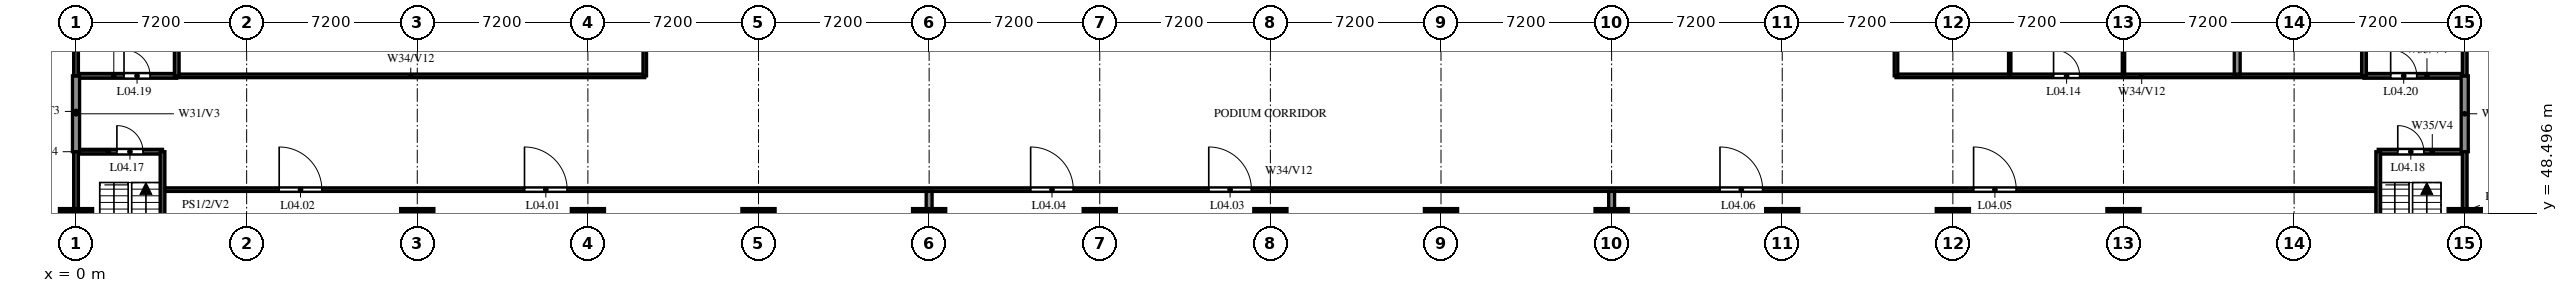
"""IFC4 building model, lengths in metres.
Left out: names, types, materials, properties, quantities, classifications, styles, units other than length and angle.
Written with IfcOpenShell. Run it as: python <this file> out.ifc"""

import sys

from ifc_helpers import new_model, si_unit, direction, frame, frame_2d, origin, origin_2d, place, context, subcontext, project, spatial, rectangle, circle, extrude, source, transform, mapped, element, fill, save


model = new_model("IFC4")
c1 = context("Model", 3, precision=1e-05, world=origin(), true_north=direction((0.0, 1.0)))
c2 = subcontext(c1, "Body", "Model", "MODEL_VIEW")
j1 = project(units=[si_unit("LENGTHUNIT", "METRE"), si_unit("PLANEANGLEUNIT", "RADIAN")], contexts=[c1])
p1 = place(None, origin())
s1 = spatial("IfcSite", under=j1, at=p1, CompositionType="ELEMENT")
p2 = place(p1, origin())
s2 = spatial("IfcBuilding", under=s1, at=p2, CompositionType="ELEMENT")
p3 = place(p2, frame((0.0, 0.0, 21.6)))
s3 = spatial("IfcBuildingStorey", under=s2, at=p3, CompositionType="ELEMENT", Elevation=21.6)
m1 = source(origin(), c2, "Body", "SweptSolid", [
    extrude(circle(Radius=0.7, at=origin_2d()), origin(), (0.0, 0.0, 1.0), 4.95),
])
for number, where, z_axis, x_axis in (
    (1, (0.0, 48.0, 0.0), (0.0, 0.0, 1.0), (1.0, 0.0, 0.0)),
    (2, (14.4, 48.0, 0.0), (0.0, 0.0, 1.0), (1.0, 0.0, 0.0)),
    (3, (21.6, 48.0, 0.0), (0.0, 0.0, 1.0), (1.0, 0.0, 0.0)),
    (4, (28.8, 48.0, 0.0), (0.0, 0.0, 1.0), (1.0, 0.0, 0.0)),
    (5, (36.0, 48.0, 0.0), (0.0, 0.0, 1.0), (1.0, 0.0, 0.0)),
    (6, (43.2, 48.0, 0.0), (0.0, 0.0, 1.0), (1.0, 0.0, 0.0)),
    (7, (50.4, 48.0, 0.0), (0.0, 0.0, 1.0), (1.0, 0.0, 0.0)),
    (8, (57.6, 48.0, 0.0), (0.0, 0.0, 1.0), (1.0, 0.0, 0.0)),
    (9, (64.8, 48.0, 0.0), (0.0, 0.0, 1.0), (1.0, 0.0, 0.0)),
    (10, (72.0, 48.0, 0.0), (0.0, 0.0, 1.0), (1.0, 0.0, 0.0)),
    (11, (79.2, 48.0, 0.0), (0.0, 0.0, 1.0), (1.0, 0.0, 0.0)),
    (12, (86.4, 48.0, 0.0), (0.0, 0.0, 1.0), (1.0, 0.0, 0.0)),
    (13, (100.8, 48.0, 0.0), (0.0, 0.0, 1.0), (1.0, 0.0, 0.0)),
):
    element("IfcColumn", number, at=place(p3, frame(where, z_axis=z_axis, x_axis=x_axis)), inside=s3, PredefinedType="COLUMN", context=c2, shape_type="MappedRepresentation", body=[
        mapped(m1, transform((0.0, 0.0, 0.0))),
    ])
p4 = place(p3, frame((3.75, 49.5, 0.0), z_axis=(0.0, 0.0, 1.0), x_axis=(1.0, 0.0, 0.0)))
e14 = element("IfcWall", 14, at=p4, inside=s3, PredefinedType="PARTITIONING", context=c2, shape_type="SweptSolid", body=[
    extrude(rectangle(XDim=93.3, YDim=0.15, at=frame_2d((46.65, 0.0))), origin(), (0.0, 0.0, 1.0), 3.45),
])
p5 = place(p4, frame((15.175, 0.0, 0.0)))
e15 = element("IfcOpeningElement", 15, at=p5, cuts=e14, PredefinedType="OPENING", context=c2, shape_type="SweptSolid", body=[
    extrude(rectangle(XDim=1.8, YDim=2.1, at=frame_2d((0.9, 1.05))), frame((0.0, 0.085, 0.0), z_axis=(0.0, -1.0, 0.0), x_axis=(1.0, 0.0, 0.0)), (0.0, 0.0, 1.0), 0.17),
])
p6 = place(p4, frame((4.823, 0.0, 0.0)))
e16 = element("IfcOpeningElement", 16, at=p6, cuts=e14, PredefinedType="OPENING", context=c2, shape_type="SweptSolid", body=[
    extrude(rectangle(XDim=1.8, YDim=2.1, at=frame_2d((0.9, 1.05))), frame((0.0, 0.085, 0.0), z_axis=(0.0, -1.0, 0.0), x_axis=(1.0, 0.0, 0.0)), (0.0, 0.0, 1.0), 0.17),
])
p7 = place(p4, frame((44.05, 0.0, 0.0)))
e17 = element("IfcOpeningElement", 17, at=p7, cuts=e14, PredefinedType="OPENING", context=c2, shape_type="SweptSolid", body=[
    extrude(rectangle(XDim=1.8, YDim=2.1, at=frame_2d((0.9, 1.05))), frame((0.0, 0.085, 0.0), z_axis=(0.0, -1.0, 0.0), x_axis=(1.0, 0.0, 0.0)), (0.0, 0.0, 1.0), 0.17),
])
p8 = place(p4, frame((36.534, 0.0, 0.0)))
e18 = element("IfcOpeningElement", 18, at=p8, cuts=e14, PredefinedType="OPENING", context=c2, shape_type="SweptSolid", body=[
    extrude(rectangle(XDim=1.8, YDim=2.1, at=frame_2d((0.9, 1.05))), frame((0.0, 0.085, 0.0), z_axis=(0.0, -1.0, 0.0), x_axis=(1.0, 0.0, 0.0)), (0.0, 0.0, 1.0), 0.17),
])
p9 = place(p4, frame((76.325, 0.0, 0.0)))
e19 = element("IfcOpeningElement", 19, at=p9, cuts=e14, PredefinedType="OPENING", context=c2, shape_type="SweptSolid", body=[
    extrude(rectangle(XDim=1.8, YDim=2.1, at=frame_2d((0.9, 1.05))), frame((0.0, 0.085, 0.0), z_axis=(0.0, -1.0, 0.0), x_axis=(1.0, 0.0, 0.0)), (0.0, 0.0, 1.0), 0.17),
])
p10 = place(p4, frame((65.623, 0.0, 0.0)))
e20 = element("IfcOpeningElement", 20, at=p10, cuts=e14, PredefinedType="OPENING", context=c2, shape_type="SweptSolid", body=[
    extrude(rectangle(XDim=1.8, YDim=2.1, at=frame_2d((0.9, 1.05))), frame((0.0, 0.085, 0.0), z_axis=(0.0, -1.0, 0.0), x_axis=(1.0, 0.0, 0.0)), (0.0, 0.0, 1.0), 0.17),
])
p11 = place(p3, frame((0.0, 51.1, 0.0), z_axis=(0.0, 0.0, 1.0), x_axis=(1.0, 0.0, 0.0)))
e21 = element("IfcWall", 21, at=p11, inside=s3, PredefinedType="SOLIDWALL", context=c2, shape_type="SweptSolid", body=[
    extrude(rectangle(XDim=3.65, YDim=0.2, at=frame_2d((1.825, 0.0))), origin(), (0.0, 0.0, 1.0), 4.95),
])
p12 = place(p11, frame((1.725, 0.0, 0.0)))
e22 = element("IfcOpeningElement", 22, at=p12, cuts=e21, PredefinedType="OPENING", context=c2, shape_type="SweptSolid", body=[
    extrude(rectangle(XDim=1.1, YDim=2.1, at=frame_2d((0.55, 1.05))), frame((0.0, 0.11, 0.0), z_axis=(0.0, -1.0, 0.0), x_axis=(1.0, 0.0, 0.0)), (0.0, 0.0, 1.0), 0.22),
])
p13 = place(p3, frame((97.15, 51.1, 0.0), z_axis=(0.0, 0.0, 1.0), x_axis=(1.0, 0.0, 0.0)))
e23 = element("IfcWall", 23, at=p13, inside=s3, PredefinedType="SOLIDWALL", context=c2, shape_type="SweptSolid", body=[
    extrude(rectangle(XDim=3.65, YDim=0.2, at=frame_2d((1.825, 0.0))), origin(), (0.0, 0.0, 1.0), 4.95),
])
p14 = place(p13, frame((0.825, 0.0, 0.0)))
e24 = element("IfcOpeningElement", 24, at=p14, cuts=e23, PredefinedType="OPENING", context=c2, shape_type="SweptSolid", body=[
    extrude(rectangle(XDim=1.1, YDim=2.1, at=frame_2d((0.55, 1.05))), frame((0.0, 0.11, 0.0), z_axis=(0.0, -1.0, 0.0), x_axis=(1.0, 0.0, 0.0)), (0.0, 0.0, 1.0), 0.22),
])
p15 = place(p3, frame((4.25, 54.3, 0.0), z_axis=(0.0, 0.0, 1.0), x_axis=(1.0, 0.0, 0.0)))
e25 = element("IfcWall", 25, at=p15, inside=s3, PredefinedType="PARTITIONING", context=c2, shape_type="SweptSolid", body=[
    extrude(rectangle(XDim=19.75, YDim=0.15, at=frame_2d((9.875, 0.0))), origin(), (0.0, 0.0, 1.0), 3.45),
])
p16 = place(p3, frame((76.8, 54.3, 0.0), z_axis=(0.0, 0.0, 1.0), x_axis=(1.0, 0.0, 0.0)))
e26 = element("IfcWall", 26, at=p16, inside=s3, PredefinedType="PARTITIONING", context=c2, shape_type="SweptSolid", body=[
    extrude(rectangle(XDim=19.75, YDim=0.15, at=frame_2d((9.875, 0.0))), origin(), (0.0, 0.0, 1.0), 3.45),
])
p17 = place(p16, frame((6.65, 0.0, 0.0)))
e27 = element("IfcOpeningElement", 27, at=p17, cuts=e26, PredefinedType="OPENING", context=c2, shape_type="SweptSolid", body=[
    extrude(rectangle(XDim=1.1, YDim=2.1, at=frame_2d((0.55, 1.05))), frame((0.0, 0.085, 0.0), z_axis=(0.0, -1.0, 0.0), x_axis=(1.0, 0.0, 0.0)), (0.0, 0.0, 1.0), 0.17),
])
p18 = place(p3, frame((0.0, 54.3, 0.0), z_axis=(0.0, 0.0, 1.0), x_axis=(1.0, 0.0, 0.0)))
e28 = element("IfcWall", 28, at=p18, inside=s3, PredefinedType="SOLIDWALL", context=c2, shape_type="SweptSolid", body=[
    extrude(rectangle(XDim=4.25, YDim=0.2, at=frame_2d((2.125, 0.0))), origin(), (0.0, 0.0, 1.0), 4.95),
])
p19 = place(p18, frame((2.025, 0.0, 0.0)))
e29 = element("IfcOpeningElement", 29, at=p19, cuts=e28, PredefinedType="OPENING", context=c2, shape_type="SweptSolid", body=[
    extrude(rectangle(XDim=1.1, YDim=2.1, at=frame_2d((0.55, 1.05))), frame((0.0, 0.11, 0.0), z_axis=(0.0, -1.0, 0.0), x_axis=(1.0, 0.0, 0.0)), (0.0, 0.0, 1.0), 0.22),
])
p20 = place(p3, frame((96.55, 54.3, 0.0), z_axis=(0.0, 0.0, 1.0), x_axis=(1.0, 0.0, 0.0)))
e30 = element("IfcWall", 30, at=p20, inside=s3, PredefinedType="SOLIDWALL", context=c2, shape_type="SweptSolid", body=[
    extrude(rectangle(XDim=4.25, YDim=0.2, at=frame_2d((2.125, 0.0))), origin(), (0.0, 0.0, 1.0), 4.95),
])
p21 = place(p20, frame((1.125, 0.0, 0.0)))
e31 = element("IfcOpeningElement", 31, at=p21, cuts=e30, PredefinedType="OPENING", context=c2, shape_type="SweptSolid", body=[
    extrude(rectangle(XDim=1.1, YDim=2.1, at=frame_2d((0.55, 1.05))), frame((0.0, 0.11, 0.0), z_axis=(0.0, -1.0, 0.0), x_axis=(1.0, 0.0, 0.0)), (0.0, 0.0, 1.0), 0.22),
])
p22 = place(p3, frame((0.0, 51.1, 0.0), z_axis=(0.0, 0.0, 1.0), x_axis=(0.0, 1.0, 0.0)))
e32 = element("IfcWall", 32, at=p22, inside=s3, PredefinedType="SOLIDWALL", context=c2, shape_type="SweptSolid", body=[
    extrude(rectangle(XDim=3.2, YDim=0.3, at=frame_2d((1.6, 0.0))), origin(), (0.0, 0.0, 1.0), 4.95),
])
p23 = place(p3, frame((0.0, 42.9, 0.0), z_axis=(0.0, 0.0, 1.0), x_axis=(0.0, 1.0, 0.0)))
e33 = element("IfcWall", 33, at=p23, inside=s3, PredefinedType="SOLIDWALL", context=c2, shape_type="SweptSolid", body=[
    extrude(rectangle(XDim=8.2, YDim=0.2, at=frame_2d((4.1, 0.0))), origin(), (0.0, 0.0, 1.0), 4.95),
])
p24 = place(p3, frame((0.0, 54.3, 0.0), z_axis=(0.0, 0.0, 1.0), x_axis=(0.0, 1.0, 0.0)))
e34 = element("IfcWall", 34, at=p24, inside=s3, PredefinedType="SOLIDWALL", context=c2, shape_type="SweptSolid", body=[
    extrude(rectangle(XDim=8.8, YDim=0.2, at=frame_2d((4.4, 0.0))), origin(), (0.0, 0.0, 1.0), 4.95),
])
p25 = place(p3, frame((3.65, 42.9, 0.0), z_axis=(0.0, 0.0, 1.0), x_axis=(0.0, 1.0, 0.0)))
e35 = element("IfcWall", 35, at=p25, inside=s3, PredefinedType="SOLIDWALL", context=c2, shape_type="SweptSolid", body=[
    extrude(rectangle(XDim=8.2, YDim=0.2, at=frame_2d((4.1, 0.0))), origin(), (0.0, 0.0, 1.0), 4.95),
])
p26 = place(p3, frame((4.25, 54.3, 0.0), z_axis=(0.0, 0.0, 1.0), x_axis=(0.0, 1.0, 0.0)))
e36 = element("IfcWall", 36, at=p26, inside=s3, PredefinedType="SOLIDWALL", context=c2, shape_type="SweptSolid", body=[
    extrude(rectangle(XDim=8.8, YDim=0.2, at=frame_2d((4.4, 0.0))), origin(), (0.0, 0.0, 1.0), 4.95),
])
p27 = place(p3, frame((24.0, 54.3, 0.0), z_axis=(0.0, 0.0, 1.0), x_axis=(0.0, 1.0, 0.0)))
e37 = element("IfcWall", 37, at=p27, inside=s3, PredefinedType="PARTITIONING", context=c2, shape_type="SweptSolid", body=[
    extrude(rectangle(XDim=31.95, YDim=0.15, at=frame_2d((15.975, 0.0))), origin(), (0.0, 0.0, 1.0), 3.75),
])
p28 = place(p27, frame((7.05, 0.0, 0.0)))
e38 = element("IfcOpeningElement", 38, at=p28, cuts=e37, PredefinedType="OPENING", context=c2, shape_type="SweptSolid", body=[
    extrude(rectangle(XDim=1.8, YDim=2.1, at=frame_2d((0.9, 1.05))), frame((0.0, 0.085, 0.0), z_axis=(0.0, -1.0, 0.0), x_axis=(1.0, 0.0, 0.0)), (0.0, 0.0, 1.0), 0.17),
])
p29 = place(p27, frame((23.1, 0.0, 0.0)))
e39 = element("IfcOpeningElement", 39, at=p29, cuts=e37, PredefinedType="OPENING", context=c2, shape_type="SweptSolid", body=[
    extrude(rectangle(XDim=1.8, YDim=2.1, at=frame_2d((0.9, 1.05))), frame((0.0, 0.085, 0.0), z_axis=(0.0, -1.0, 0.0), x_axis=(1.0, 0.0, 0.0)), (0.0, 0.0, 1.0), 0.17),
])
for number, where, z_axis, x_axis in (
    (40, (36.0, 19.35, 0.0), (0.0, 0.0, 1.0), (0.0, 1.0, 0.0)),
    (41, (64.8, 19.35, 0.0), (0.0, 0.0, 1.0), (0.0, 1.0, 0.0)),
):
    element("IfcWall", number, at=place(p3, frame(where, z_axis=z_axis, x_axis=x_axis)), inside=s3, PredefinedType="SOLIDWALL", context=c2, shape_type="SweptSolid", body=[
        extrude(rectangle(XDim=30.075, YDim=0.25, at=frame_2d((15.038, 0.0))), origin(), (0.0, 0.0, 1.0), 3.45),
    ])
p30 = place(p3, frame((76.8, 54.3, 0.0), z_axis=(0.0, 0.0, 1.0), x_axis=(0.0, 1.0, 0.0)))
e42 = element("IfcWall", 42, at=p30, inside=s3, PredefinedType="PARTITIONING", context=c2, shape_type="SweptSolid", body=[
    extrude(rectangle(XDim=31.95, YDim=0.15, at=frame_2d((15.975, 0.0))), origin(), (0.0, 0.0, 1.0), 3.75),
])
p31 = place(p30, frame((10.65, 0.0, 0.0)))
e43 = element("IfcOpeningElement", 43, at=p31, cuts=e42, PredefinedType="OPENING", context=c2, shape_type="SweptSolid", body=[
    extrude(rectangle(XDim=1.8, YDim=2.1, at=frame_2d((0.9, 1.05))), frame((0.0, 0.085, 0.0), z_axis=(0.0, -1.0, 0.0), x_axis=(1.0, 0.0, 0.0)), (0.0, 0.0, 1.0), 0.17),
])
p32 = place(p30, frame((23.45, 0.0, 0.0)))
e44 = element("IfcOpeningElement", 44, at=p32, cuts=e42, PredefinedType="OPENING", context=c2, shape_type="SweptSolid", body=[
    extrude(rectangle(XDim=1.1, YDim=2.1, at=frame_2d((0.55, 1.05))), frame((0.0, 0.085, 0.0), z_axis=(0.0, -1.0, 0.0), x_axis=(1.0, 0.0, 0.0)), (0.0, 0.0, 1.0), 0.17),
])
p33 = place(p3, frame((81.6, 54.375, 0.0), z_axis=(0.0, 0.0, 1.0), x_axis=(0.0, 1.0, 0.0)))
e45 = element("IfcWall", 45, at=p33, inside=s3, PredefinedType="PARTITIONING", context=c2, shape_type="SweptSolid", body=[
    extrude(rectangle(XDim=7.0, YDim=0.1, at=frame_2d((3.5, 0.0))), origin(), (0.0, 0.0, 1.0), 4.95),
])
p34 = place(p33, frame((1.525, 0.0, 0.0)))
e46 = element("IfcOpeningElement", 46, at=p34, cuts=e45, PredefinedType="OPENING", context=c2, shape_type="SweptSolid", body=[
    extrude(rectangle(XDim=1.0, YDim=2.1, at=frame_2d((0.5, 1.05))), frame((0.0, 0.06, 0.0), z_axis=(0.0, -1.0, 0.0), x_axis=(1.0, 0.0, 0.0)), (0.0, 0.0, 1.0), 0.12),
])
p35 = place(p33, frame((5.125, 0.0, 0.0)))
e47 = element("IfcOpeningElement", 47, at=p35, cuts=e45, PredefinedType="OPENING", context=c2, shape_type="SweptSolid", body=[
    extrude(rectangle(XDim=1.0, YDim=2.1, at=frame_2d((0.5, 1.05))), frame((0.0, 0.06, 0.0), z_axis=(0.0, -1.0, 0.0), x_axis=(1.0, 0.0, 0.0)), (0.0, 0.0, 1.0), 0.12),
])
p36 = place(p3, frame((86.4, 54.375, 0.0), z_axis=(0.0, 0.0, 1.0), x_axis=(0.0, 1.0, 0.0)))
e48 = element("IfcWall", 48, at=p36, inside=s3, PredefinedType="PARTITIONING", context=c2, shape_type="SweptSolid", body=[
    extrude(rectangle(XDim=7.0, YDim=0.1, at=frame_2d((3.5, 0.0))), origin(), (0.0, 0.0, 1.0), 3.45),
])
p37 = place(p36, frame((3.025, 0.0, 0.0)))
e49 = element("IfcOpeningElement", 49, at=p37, cuts=e48, PredefinedType="OPENING", context=c2, shape_type="SweptSolid", body=[
    extrude(rectangle(XDim=1.0, YDim=2.1, at=frame_2d((0.5, 1.05))), frame((0.0, 0.06, 0.0), z_axis=(0.0, -1.0, 0.0), x_axis=(1.0, 0.0, 0.0)), (0.0, 0.0, 1.0), 0.12),
])
p38 = place(p3, frame((91.2, 54.375, 0.0), z_axis=(0.0, 0.0, 1.0), x_axis=(0.0, 1.0, 0.0)))
e50 = element("IfcWall", 50, at=p38, inside=s3, PredefinedType="SOLIDWALL", context=c2, shape_type="SweptSolid", body=[
    extrude(rectangle(XDim=7.125, YDim=0.25, at=frame_2d((3.562, 0.0))), origin(), (0.0, 0.0, 1.0), 4.95),
])
p39 = place(p3, frame((96.55, 54.3, 0.0), z_axis=(0.0, 0.0, 1.0), x_axis=(0.0, 1.0, 0.0)))
e51 = element("IfcWall", 51, at=p39, inside=s3, PredefinedType="SOLIDWALL", context=c2, shape_type="SweptSolid", body=[
    extrude(rectangle(XDim=8.8, YDim=0.2, at=frame_2d((4.4, 0.0))), origin(), (0.0, 0.0, 1.0), 4.95),
])
p40 = place(p3, frame((97.15, 42.9, 0.0), z_axis=(0.0, 0.0, 1.0), x_axis=(0.0, 1.0, 0.0)))
e52 = element("IfcWall", 52, at=p40, inside=s3, PredefinedType="SOLIDWALL", context=c2, shape_type="SweptSolid", body=[
    extrude(rectangle(XDim=8.2, YDim=0.2, at=frame_2d((4.1, 0.0))), origin(), (0.0, 0.0, 1.0), 4.95),
])
p41 = place(p3, frame((100.8, 51.1, 0.0), z_axis=(0.0, 0.0, 1.0), x_axis=(0.0, 1.0, 0.0)))
e53 = element("IfcWall", 53, at=p41, inside=s3, PredefinedType="SOLIDWALL", context=c2, shape_type="SweptSolid", body=[
    extrude(rectangle(XDim=3.2, YDim=0.3, at=frame_2d((1.6, 0.0))), origin(), (0.0, 0.0, 1.0), 4.95),
])
p42 = place(p3, frame((100.8, 42.9, 0.0), z_axis=(0.0, 0.0, 1.0), x_axis=(0.0, 1.0, 0.0)))
e54 = element("IfcWall", 54, at=p42, inside=s3, PredefinedType="SOLIDWALL", context=c2, shape_type="SweptSolid", body=[
    extrude(rectangle(XDim=8.2, YDim=0.2, at=frame_2d((4.1, 0.0))), origin(), (0.0, 0.0, 1.0), 4.95),
])
p43 = place(p3, frame((100.8, 54.3, 0.0), z_axis=(0.0, 0.0, 1.0), x_axis=(0.0, 1.0, 0.0)))
e55 = element("IfcWall", 55, at=p43, inside=s3, PredefinedType="SOLIDWALL", context=c2, shape_type="SweptSolid", body=[
    extrude(rectangle(XDim=8.8, YDim=0.2, at=frame_2d((4.4, 0.0))), origin(), (0.0, 0.0, 1.0), 4.95),
])
p44 = place(p5, origin())
e56 = element("IfcDoor", 56, at=p44, inside=s3, OperationType="DOUBLE_DOOR_SINGLE_SWING", PredefinedType="DOOR", context=c2, shape_type="SweptSolid", body=[
    extrude(rectangle(XDim=1.8, YDim=2.1, at=frame_2d((0.9, 1.05))), frame((0.0, 0.025, 0.0), z_axis=(0.0, -1.0, 0.0), x_axis=(1.0, 0.0, 0.0)), (0.0, 0.0, 1.0), 0.05),
])
fill(e15, e56)
p45 = place(p6, origin())
e57 = element("IfcDoor", 57, at=p45, inside=s3, OperationType="DOUBLE_DOOR_SINGLE_SWING", PredefinedType="DOOR", context=c2, shape_type="SweptSolid", body=[
    extrude(rectangle(XDim=1.8, YDim=2.1, at=frame_2d((0.9, 1.05))), frame((0.0, 0.025, 0.0), z_axis=(0.0, -1.0, 0.0), x_axis=(1.0, 0.0, 0.0)), (0.0, 0.0, 1.0), 0.05),
])
fill(e16, e57)
p46 = place(p7, origin())
e58 = element("IfcDoor", 58, at=p46, inside=s3, OperationType="DOUBLE_DOOR_SINGLE_SWING", PredefinedType="DOOR", context=c2, shape_type="SweptSolid", body=[
    extrude(rectangle(XDim=1.8, YDim=2.1, at=frame_2d((0.9, 1.05))), frame((0.0, 0.025, 0.0), z_axis=(0.0, -1.0, 0.0), x_axis=(1.0, 0.0, 0.0)), (0.0, 0.0, 1.0), 0.05),
])
fill(e17, e58)
p47 = place(p8, origin())
e59 = element("IfcDoor", 59, at=p47, inside=s3, OperationType="DOUBLE_DOOR_SINGLE_SWING", PredefinedType="DOOR", context=c2, shape_type="SweptSolid", body=[
    extrude(rectangle(XDim=1.8, YDim=2.1, at=frame_2d((0.9, 1.05))), frame((0.0, 0.025, 0.0), z_axis=(0.0, -1.0, 0.0), x_axis=(1.0, 0.0, 0.0)), (0.0, 0.0, 1.0), 0.05),
])
fill(e18, e59)
p48 = place(p9, origin())
e60 = element("IfcDoor", 60, at=p48, inside=s3, OperationType="DOUBLE_DOOR_SINGLE_SWING", PredefinedType="DOOR", context=c2, shape_type="SweptSolid", body=[
    extrude(rectangle(XDim=1.8, YDim=2.1, at=frame_2d((0.9, 1.05))), frame((0.0, 0.025, 0.0), z_axis=(0.0, -1.0, 0.0), x_axis=(1.0, 0.0, 0.0)), (0.0, 0.0, 1.0), 0.05),
])
fill(e19, e60)
p49 = place(p10, origin())
e61 = element("IfcDoor", 61, at=p49, inside=s3, OperationType="DOUBLE_DOOR_SINGLE_SWING", PredefinedType="DOOR", context=c2, shape_type="SweptSolid", body=[
    extrude(rectangle(XDim=1.8, YDim=2.1, at=frame_2d((0.9, 1.05))), frame((0.0, 0.025, 0.0), z_axis=(0.0, -1.0, 0.0), x_axis=(1.0, 0.0, 0.0)), (0.0, 0.0, 1.0), 0.05),
])
fill(e20, e61)
p50 = place(p17, origin())
e62 = element("IfcDoor", 62, at=p50, inside=s3, OperationType="SINGLE_SWING_LEFT", PredefinedType="DOOR", context=c2, shape_type="SweptSolid", body=[
    extrude(rectangle(XDim=1.1, YDim=2.1, at=frame_2d((0.55, 1.05))), frame((0.0, 0.025, 0.0), z_axis=(0.0, -1.0, 0.0), x_axis=(1.0, 0.0, 0.0)), (0.0, 0.0, 1.0), 0.05),
])
fill(e27, e62)
p51 = place(p12, origin())
e63 = element("IfcDoor", 63, at=p51, inside=s3, OperationType="SINGLE_SWING_RIGHT", PredefinedType="DOOR", context=c2, shape_type="SweptSolid", body=[
    extrude(rectangle(XDim=1.1, YDim=2.1, at=frame_2d((0.55, 1.05))), frame((0.0, 0.025, 0.0), z_axis=(0.0, -1.0, 0.0), x_axis=(1.0, 0.0, 0.0)), (0.0, 0.0, 1.0), 0.05),
])
fill(e22, e63)
p52 = place(p14, origin())
e64 = element("IfcDoor", 64, at=p52, inside=s3, OperationType="SINGLE_SWING_LEFT", PredefinedType="DOOR", context=c2, shape_type="SweptSolid", body=[
    extrude(rectangle(XDim=1.1, YDim=2.1, at=frame_2d((0.55, 1.05))), frame((0.0, 0.025, 0.0), z_axis=(0.0, -1.0, 0.0), x_axis=(1.0, 0.0, 0.0)), (0.0, 0.0, 1.0), 0.05),
])
fill(e24, e64)
p53 = place(p19, origin())
e65 = element("IfcDoor", 65, at=p53, inside=s3, OperationType="SINGLE_SWING_RIGHT", PredefinedType="DOOR", context=c2, shape_type="SweptSolid", body=[
    extrude(rectangle(XDim=1.1, YDim=2.1, at=frame_2d((0.55, 1.05))), frame((0.0, 0.025, 0.0), z_axis=(0.0, -1.0, 0.0), x_axis=(1.0, 0.0, 0.0)), (0.0, 0.0, 1.0), 0.05),
])
fill(e29, e65)
p54 = place(p21, origin())
e66 = element("IfcDoor", 66, at=p54, inside=s3, OperationType="SINGLE_SWING_LEFT", PredefinedType="DOOR", context=c2, shape_type="SweptSolid", body=[
    extrude(rectangle(XDim=1.1, YDim=2.1, at=frame_2d((0.55, 1.05))), frame((0.0, 0.025, 0.0), z_axis=(0.0, -1.0, 0.0), x_axis=(1.0, 0.0, 0.0)), (0.0, 0.0, 1.0), 0.05),
])
fill(e31, e66)
save(model, sys.argv[1])
